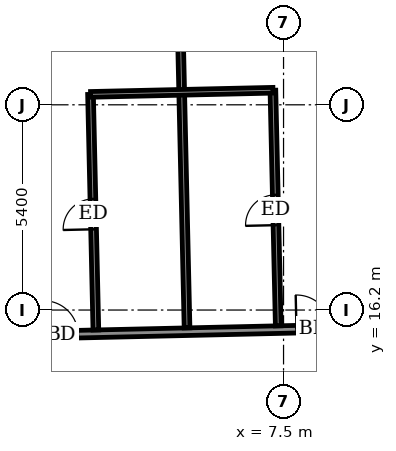
"""IFC4 building model, lengths in metres.
Left out: names, types, materials, properties, quantities, classifications, styles, units other than length and angle.
Written with IfcOpenShell. Run it as: python <this file> out.ifc"""

import sys

from ifc_helpers import new_model, si_unit, direction, frame, frame_2d, origin, place, context, subcontext, project, spatial, rectangle, extrude, element, fill, save


model = new_model("IFC4")
c1 = context("Model", 3, precision=1e-05, world=origin(), true_north=direction((0.0, 1.0)))
c2 = subcontext(c1, "Body", "Model", "MODEL_VIEW")
j1 = project(units=[si_unit("LENGTHUNIT", "METRE"), si_unit("PLANEANGLEUNIT", "RADIAN")], contexts=[c1])
p1 = place(None, origin())
s1 = spatial("IfcSite", under=j1, at=p1, CompositionType="ELEMENT")
p2 = place(p1, origin())
s2 = spatial("IfcBuilding", under=s1, at=p2, CompositionType="ELEMENT")
p3 = place(p2, frame((0.0, 0.0, 297.9)))
s3 = spatial("IfcBuildingStorey", under=s2, at=p3, CompositionType="ELEMENT", Elevation=297.9)
p4 = place(p3, frame((-26.401, 14.918, 0.0), z_axis=(0.0, 0.0, 1.0), x_axis=(0.99974239733, 0.022696673341, 0.0)))
e1 = element("IfcWall", 1, at=p4, inside=s3, PredefinedType="PARTITIONING", context=c2, shape_type="SweptSolid", body=[
    extrude(rectangle(XDim=55.386, YDim=0.2, at=frame_2d((27.693, 0.0))), origin(), (0.0, 0.0, 1.0), 3.05),
])
p5 = place(p4, frame((53.718, 0.0, 0.0)))
e2 = element("IfcOpeningElement", 2, at=p5, cuts=e1, PredefinedType="OPENING", context=c2, shape_type="SweptSolid", body=[
    extrude(rectangle(XDim=1.0, YDim=2.1, at=frame_2d((0.5, 1.05))), frame((0.0, 0.11, 0.0), z_axis=(0.0, -1.0, 0.0), x_axis=(1.0, 0.0, 0.0)), (0.0, 0.0, 1.0), 0.22),
])
p6 = place(p4, frame((49.325, 0.0, 0.0)))
e3 = element("IfcOpeningElement", 3, at=p6, cuts=e1, PredefinedType="OPENING", context=c2, shape_type="SweptSolid", body=[
    extrude(rectangle(XDim=0.9, YDim=2.1, at=frame_2d((0.45, 1.05))), frame((0.0, 0.11, 0.0), z_axis=(0.0, -1.0, 0.0), x_axis=(1.0, 0.0, 0.0)), (0.0, 0.0, 1.0), 0.22),
])
p7 = place(p4, frame((44.575, 0.0, 0.0)))
e4 = element("IfcOpeningElement", 4, at=p7, cuts=e1, PredefinedType="OPENING", context=c2, shape_type="SweptSolid", body=[
    extrude(rectangle(XDim=0.9, YDim=2.1, at=frame_2d((0.45, 1.05))), frame((0.0, 0.11, 0.0), z_axis=(0.0, -1.0, 0.0), x_axis=(1.0, 0.0, 0.0)), (0.0, 0.0, 1.0), 0.22),
])
p8 = place(p4, frame((42.725, 0.0, 0.0)))
e5 = element("IfcOpeningElement", 5, at=p8, cuts=e1, PredefinedType="OPENING", context=c2, shape_type="SweptSolid", body=[
    extrude(rectangle(XDim=0.9, YDim=2.1, at=frame_2d((0.45, 1.05))), frame((0.0, 0.11, 0.0), z_axis=(0.0, -1.0, 0.0), x_axis=(1.0, 0.0, 0.0)), (0.0, 0.0, 1.0), 0.22),
])
p9 = place(p4, frame((36.1, 0.0, 0.0)))
e6 = element("IfcOpeningElement", 6, at=p9, cuts=e1, PredefinedType="OPENING", context=c2, shape_type="SweptSolid", body=[
    extrude(rectangle(XDim=0.9, YDim=2.1, at=frame_2d((0.45, 1.05))), frame((0.0, 0.11, 0.0), z_axis=(0.0, -1.0, 0.0), x_axis=(1.0, 0.0, 0.0)), (0.0, 0.0, 1.0), 0.22),
])
p10 = place(p4, frame((34.25, 0.0, 0.0)))
e7 = element("IfcOpeningElement", 7, at=p10, cuts=e1, PredefinedType="OPENING", context=c2, shape_type="SweptSolid", body=[
    extrude(rectangle(XDim=0.9, YDim=2.1, at=frame_2d((0.45, 1.05))), frame((0.0, 0.11, 0.0), z_axis=(0.0, -1.0, 0.0), x_axis=(1.0, 0.0, 0.0)), (0.0, 0.0, 1.0), 0.22),
])
p11 = place(p4, frame((27.6, 0.0, 0.0)))
e8 = element("IfcOpeningElement", 8, at=p11, cuts=e1, PredefinedType="OPENING", context=c2, shape_type="SweptSolid", body=[
    extrude(rectangle(XDim=0.9, YDim=2.1, at=frame_2d((0.45, 1.05))), frame((0.0, 0.11, 0.0), z_axis=(0.0, -1.0, 0.0), x_axis=(1.0, 0.0, 0.0)), (0.0, 0.0, 1.0), 0.22),
])
p12 = place(p4, frame((25.775, 0.0, 0.0)))
e9 = element("IfcOpeningElement", 9, at=p12, cuts=e1, PredefinedType="OPENING", context=c2, shape_type="SweptSolid", body=[
    extrude(rectangle(XDim=0.9, YDim=2.1, at=frame_2d((0.45, 1.05))), frame((0.0, 0.11, 0.0), z_axis=(0.0, -1.0, 0.0), x_axis=(1.0, 0.0, 0.0)), (0.0, 0.0, 1.0), 0.22),
])
p13 = place(p4, frame((19.15, 0.0, 0.0)))
e10 = element("IfcOpeningElement", 10, at=p13, cuts=e1, PredefinedType="OPENING", context=c2, shape_type="SweptSolid", body=[
    extrude(rectangle(XDim=0.9, YDim=2.1, at=frame_2d((0.45, 1.05))), frame((0.0, 0.11, 0.0), z_axis=(0.0, -1.0, 0.0), x_axis=(1.0, 0.0, 0.0)), (0.0, 0.0, 1.0), 0.22),
])
p14 = place(p4, frame((17.3, 0.0, 0.0)))
e11 = element("IfcOpeningElement", 11, at=p14, cuts=e1, PredefinedType="OPENING", context=c2, shape_type="SweptSolid", body=[
    extrude(rectangle(XDim=0.9, YDim=2.1, at=frame_2d((0.45, 1.05))), frame((0.0, 0.11, 0.0), z_axis=(0.0, -1.0, 0.0), x_axis=(1.0, 0.0, 0.0)), (0.0, 0.0, 1.0), 0.22),
])
p15 = place(p4, frame((10.65, 0.0, 0.0)))
e12 = element("IfcOpeningElement", 12, at=p15, cuts=e1, PredefinedType="OPENING", context=c2, shape_type="SweptSolid", body=[
    extrude(rectangle(XDim=0.9, YDim=2.1, at=frame_2d((0.45, 1.05))), frame((0.0, 0.11, 0.0), z_axis=(0.0, -1.0, 0.0), x_axis=(1.0, 0.0, 0.0)), (0.0, 0.0, 1.0), 0.22),
])
p16 = place(p4, frame((8.8, 0.0, 0.0)))
e13 = element("IfcOpeningElement", 13, at=p16, cuts=e1, PredefinedType="OPENING", context=c2, shape_type="SweptSolid", body=[
    extrude(rectangle(XDim=0.9, YDim=2.1, at=frame_2d((0.45, 1.05))), frame((0.0, 0.11, 0.0), z_axis=(0.0, -1.0, 0.0), x_axis=(1.0, 0.0, 0.0)), (0.0, 0.0, 1.0), 0.22),
])
p17 = place(p4, frame((1.864, 0.0, 0.0)))
e14 = element("IfcOpeningElement", 14, at=p17, cuts=e1, PredefinedType="OPENING", context=c2, shape_type="SweptSolid", body=[
    extrude(rectangle(XDim=1.0, YDim=2.1, at=frame_2d((0.5, 1.05))), frame((0.0, 0.11, 0.0), z_axis=(0.0, -1.0, 0.0), x_axis=(1.0, 0.0, 0.0)), (0.0, 0.0, 1.0), 0.22),
])
p18 = place(p3, frame((2.562, 15.675, 0.0), z_axis=(0.0, 0.0, 1.0), x_axis=(-0.02275807565, 0.999741001456, 0.0)))
e15 = element("IfcWall", 15, at=p18, inside=s3, PredefinedType="PARTITIONING", context=c2, shape_type="SweptSolid", body=[
    extrude(rectangle(XDim=6.201, YDim=0.15, at=frame_2d((3.1, 0.0))), origin(), (0.0, 0.0, 1.0), 3.05),
])
p19 = place(p18, frame((2.65, 0.0, 0.0)))
e16 = element("IfcOpeningElement", 16, at=p19, cuts=e15, PredefinedType="OPENING", context=c2, shape_type="SweptSolid", body=[
    extrude(rectangle(XDim=0.8, YDim=2.1, at=frame_2d((0.4, 1.05))), frame((0.0, 0.085, 0.0), z_axis=(0.0, -1.0, 0.0), x_axis=(1.0, 0.0, 0.0)), (0.0, 0.0, 1.0), 0.17),
])
p20 = place(p3, frame((4.961, 15.73, 0.0), z_axis=(0.0, 0.0, 1.0), x_axis=(-0.022661475803, 0.999743195783, 0.0)))
e17 = element("IfcWall", 17, at=p20, inside=s3, PredefinedType="PARTITIONING", context=c2, shape_type="SweptSolid", body=[
    extrude(rectangle(XDim=12.4, YDim=0.15, at=frame_2d((6.2, 0.0))), origin(), (0.0, 0.0, 1.0), 3.05),
])
p21 = place(p3, frame((7.361, 15.784, 0.0), z_axis=(0.0, 0.0, 1.0), x_axis=(-0.02275807565, 0.999741001456, 0.0)))
e18 = element("IfcWall", 18, at=p21, inside=s3, PredefinedType="PARTITIONING", context=c2, shape_type="SweptSolid", body=[
    extrude(rectangle(XDim=6.201, YDim=0.15, at=frame_2d((3.1, 0.0))), origin(), (0.0, 0.0, 1.0), 3.05),
])
p22 = place(p21, frame((2.65, 0.0, 0.0)))
e19 = element("IfcOpeningElement", 19, at=p22, cuts=e18, PredefinedType="OPENING", context=c2, shape_type="SweptSolid", body=[
    extrude(rectangle(XDim=0.8, YDim=2.1, at=frame_2d((0.4, 1.05))), frame((0.0, 0.085, 0.0), z_axis=(0.0, -1.0, 0.0), x_axis=(1.0, 0.0, 0.0)), (0.0, 0.0, 1.0), 0.17),
])
p23 = place(p3, frame((2.423, 21.874, 0.0), z_axis=(0.0, 0.0, 1.0), x_axis=(0.999742675121, 0.022684433919, 0.0)))
e20 = element("IfcWall", 20, at=p23, inside=s3, PredefinedType="PARTITIONING", context=c2, shape_type="SweptSolid", body=[
    extrude(rectangle(XDim=4.8, YDim=0.15, at=frame_2d((2.4, 0.0))), origin(), (0.0, 0.0, 1.0), 3.05),
])
p24 = place(p10, origin())
e21 = element("IfcDoor", 21, at=p24, inside=s3, OperationType="SINGLE_SWING_LEFT", PredefinedType="DOOR", context=c2, shape_type="SweptSolid", body=[
    extrude(rectangle(XDim=0.9, YDim=2.1, at=frame_2d((0.45, 1.05))), frame((0.0, 0.025, 0.0), z_axis=(0.0, -1.0, 0.0), x_axis=(1.0, 0.0, 0.0)), (0.0, 0.0, 1.0), 0.05),
])
fill(e7, e21)
p25 = place(p22, origin())
e22 = element("IfcDoor", 22, at=p25, inside=s3, OperationType="SINGLE_SWING_LEFT", PredefinedType="DOOR", context=c2, shape_type="SweptSolid", body=[
    extrude(rectangle(XDim=0.8, YDim=2.1, at=frame_2d((0.4, 1.05))), frame((0.0, 0.025, 0.0), z_axis=(0.0, -1.0, 0.0), x_axis=(1.0, 0.0, 0.0)), (0.0, 0.0, 1.0), 0.05),
])
fill(e19, e22)
p26 = place(p11, origin())
e23 = element("IfcDoor", 23, at=p26, inside=s3, OperationType="SINGLE_SWING_RIGHT", PredefinedType="DOOR", context=c2, shape_type="SweptSolid", body=[
    extrude(rectangle(XDim=0.9, YDim=2.1, at=frame_2d((0.45, 1.05))), frame((0.0, 0.025, 0.0), z_axis=(0.0, -1.0, 0.0), x_axis=(1.0, 0.0, 0.0)), (0.0, 0.0, 1.0), 0.05),
])
fill(e8, e23)
p27 = place(p19, origin())
e24 = element("IfcDoor", 24, at=p27, inside=s3, OperationType="SINGLE_SWING_RIGHT", PredefinedType="DOOR", context=c2, shape_type="SweptSolid", body=[
    extrude(rectangle(XDim=0.8, YDim=2.1, at=frame_2d((0.4, 1.05))), frame((0.0, 0.025, 0.0), z_axis=(0.0, -1.0, 0.0), x_axis=(1.0, 0.0, 0.0)), (0.0, 0.0, 1.0), 0.05),
])
fill(e16, e24)
save(model, sys.argv[1])
